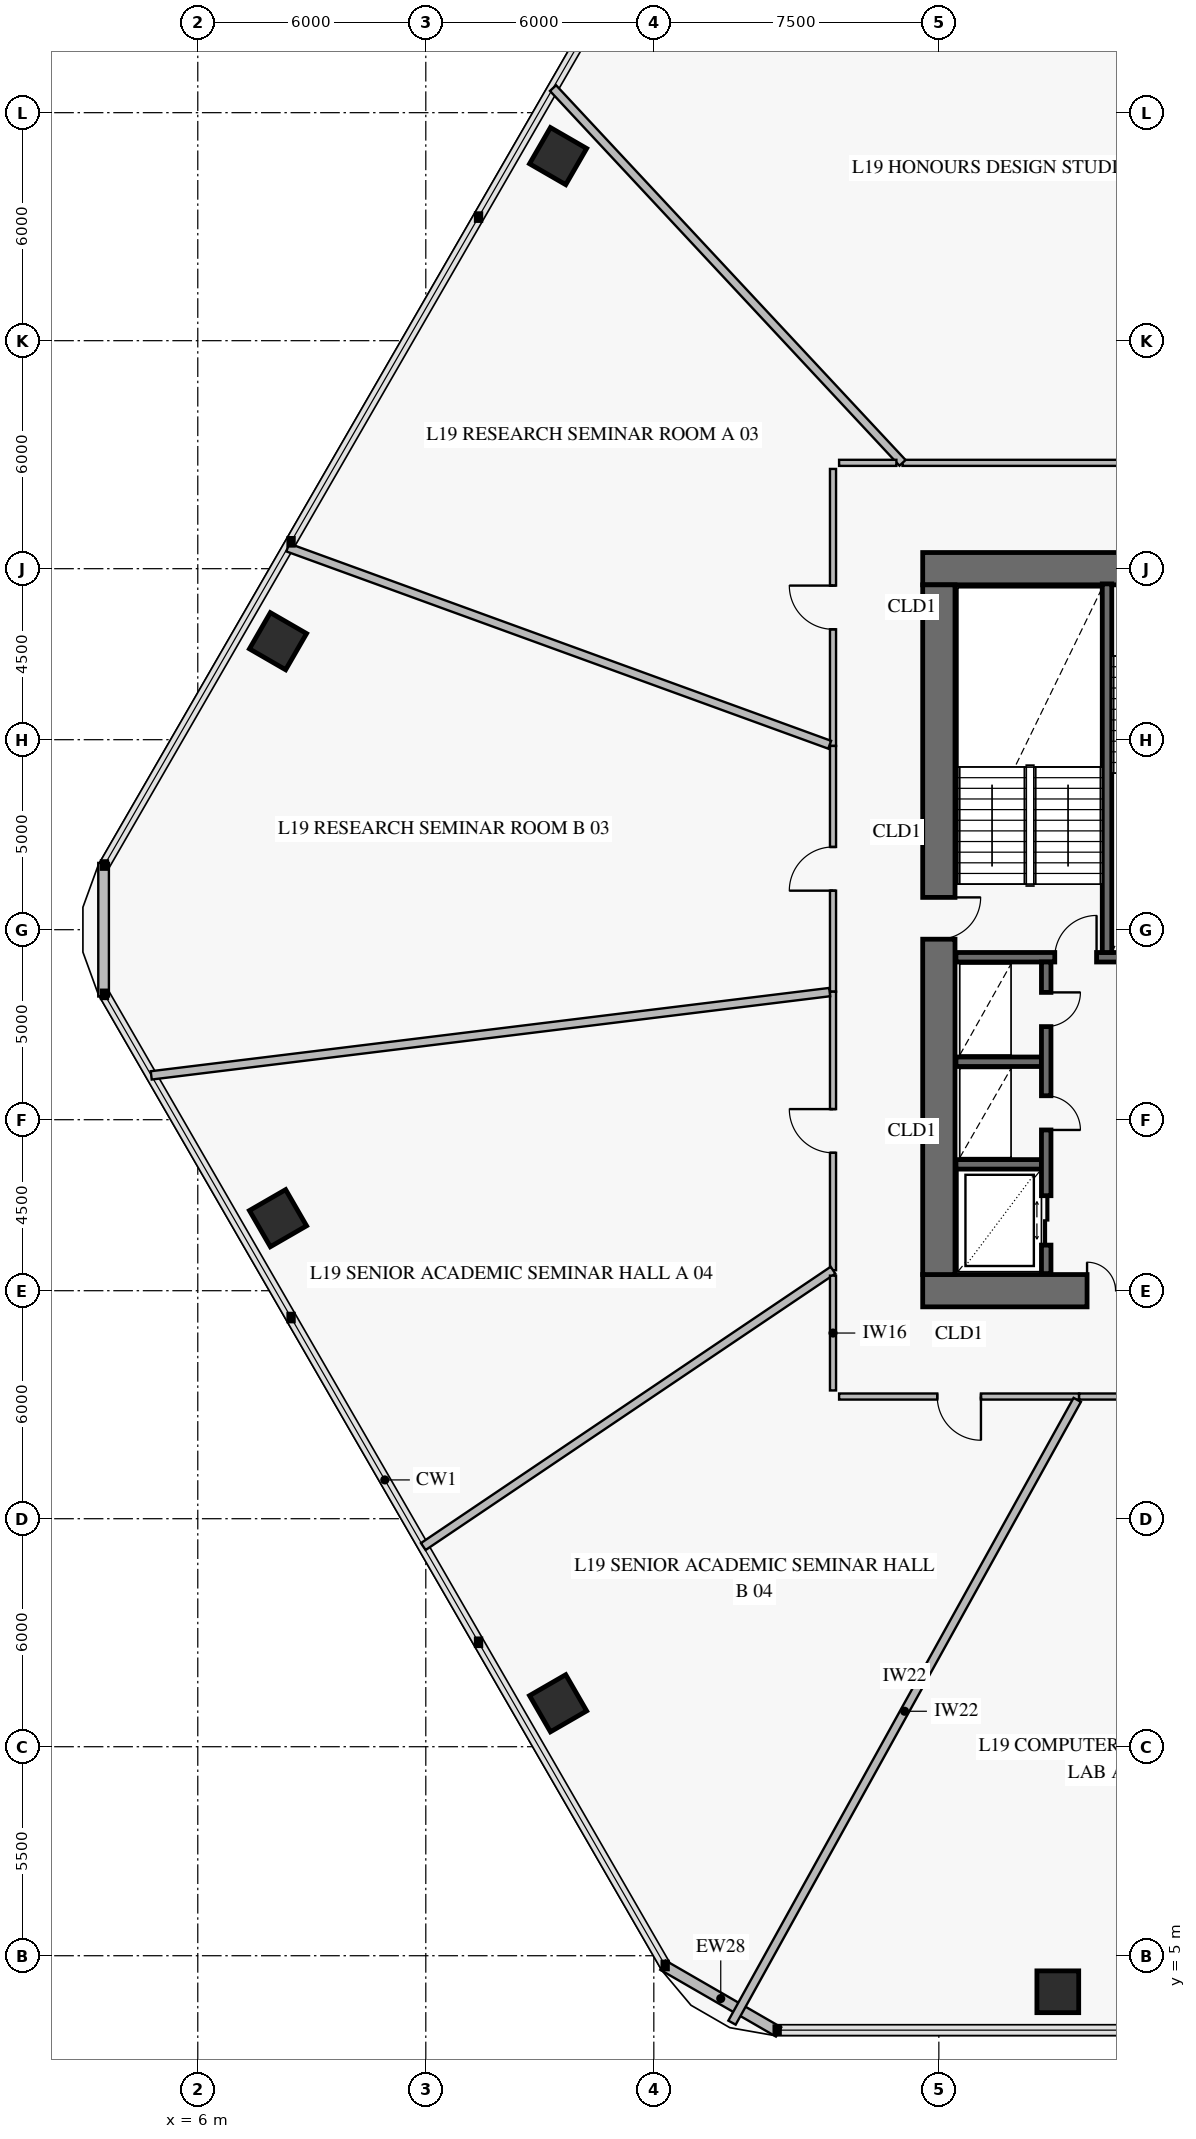
"""IFC4 building model, lengths in metres.
Left out: names, types, materials, properties, quantities, classifications, styles, units other than length and angle.
Written with IfcOpenShell. Run it as: python <this file> out.ifc"""

import sys

from ifc_helpers import new_model, si_unit, direction, frame, frame_2d, origin, origin_2d, place, context, subcontext, project, spatial, rectangle, extrude, element, fill, save


model = new_model("IFC4")
c1 = context("Model", 3, precision=1e-05, world=origin(), true_north=direction((0.0, 1.0)))
c2 = subcontext(c1, "Body", "Model", "MODEL_VIEW")
j1 = project(units=[si_unit("LENGTHUNIT", "METRE"), si_unit("PLANEANGLEUNIT", "RADIAN")], contexts=[c1])
p1 = place(None, origin())
s1 = spatial("IfcSite", under=j1, at=p1, CompositionType="ELEMENT")
p2 = place(p1, origin())
s2 = spatial("IfcBuilding", under=s1, at=p2, CompositionType="ELEMENT")
p3 = place(p2, frame((0.0, 0.0, 79.2)))
s3 = spatial("IfcBuildingStorey", under=s2, at=p3, CompositionType="ELEMENT", Elevation=79.2)
p4 = place(p3, frame((25.075, 22.5, 0.0), z_axis=(0.0, 0.0, 1.0), x_axis=(1.0, 0.0, 0.0)))
e1 = element("IfcWall", 1, at=p4, inside=s3, PredefinedType="SHEAR", context=c2, shape_type="SweptSolid", body=[
    extrude(rectangle(XDim=9.975, YDim=0.85, at=frame_2d((4.988, 0.0))), origin(), (0.0, 0.0, 1.0), 4.2),
])
p5 = place(p4, frame((4.325, 0.0, 0.0)))
e2 = element("IfcOpeningElement", 2, at=p5, cuts=e1, PredefinedType="OPENING", context=c2, shape_type="SweptSolid", body=[
    extrude(rectangle(XDim=1.5, YDim=2.15, at=frame_2d((0.75, 1.075))), frame((0.0, 0.437, 0.0), z_axis=(0.0, -1.0, 0.0), x_axis=(1.0, 0.0, 0.0)), (0.0, 0.0, 1.0), 0.874),
])
p6 = place(p3, frame((36.75, 41.5, 0.0), z_axis=(0.0, 0.0, 1.0), x_axis=(-1.0, 0.0, 0.0)))
e3 = element("IfcWall", 3, at=p6, inside=s3, PredefinedType="SHEAR", context=c2, shape_type="SweptSolid", body=[
    extrude(rectangle(XDim=11.675, YDim=0.85, at=frame_2d((5.837, 0.0))), origin(), (0.0, 0.0, 1.0), 4.2),
])
p7 = place(p6, frame((4.25, 0.0, 0.0)))
e4 = element("IfcOpeningElement", 4, at=p7, cuts=e3, PredefinedType="OPENING", context=c2, shape_type="SweptSolid", body=[
    extrude(rectangle(XDim=1.1, YDim=2.15, at=frame_2d((0.55, 1.075))), frame((0.0, 0.437, 0.0), z_axis=(0.0, -1.0, 0.0), x_axis=(1.0, 0.0, 0.0)), (0.0, 0.0, 1.0), 0.874),
])
p8 = place(p3, frame((25.5, 22.925, 0.0), z_axis=(0.0, 0.0, 1.0), x_axis=(0.0, 1.0, 0.0)))
e5 = element("IfcWall", 5, at=p8, inside=s3, PredefinedType="SHEAR", context=c2, shape_type="SweptSolid", body=[
    extrude(rectangle(XDim=18.15, YDim=0.85, at=frame_2d((9.075, 0.0))), origin(), (0.0, 0.0, 1.0), 4.2),
])
p9 = place(p8, frame((8.825, 0.0, 0.0)))
e6 = element("IfcOpeningElement", 6, at=p9, cuts=e5, PredefinedType="OPENING", context=c2, shape_type="SweptSolid", body=[
    extrude(rectangle(XDim=1.1, YDim=2.15, at=frame_2d((0.55, 1.075))), frame((0.0, 0.437, 0.0), z_axis=(0.0, -1.0, 0.0), x_axis=(1.0, 0.0, 0.0)), (0.0, 0.0, 1.0), 0.874),
])
for number, where, z_axis, x_axis in (
    (7, (15.481, 52.357, 0.0), (0.0, 0.0, 1.0), (-0.5, -0.866, 0.0)),
    (8, (8.111, 39.592, 0.0), (0.0, 0.0, 1.0), (-0.5, -0.866, 0.0)),
    (9, (8.111, 24.408, 0.0), (0.0, 0.0, 1.0), (0.5, -0.866, 0.0)),
    (10, (15.481, 11.643, 0.0), (0.0, 0.0, 1.0), (0.5, -0.866, 0.0)),
    (11, (28.63, 4.052, 0.0), (0.0, 0.0, 1.0), (1.0, 0.0, 0.0)),
):
    element("IfcColumn", number, at=place(p3, frame(where, z_axis=z_axis, x_axis=x_axis)), inside=s3, PredefinedType="COLUMN", context=c2, shape_type="SweptSolid", body=[
        extrude(rectangle(XDim=1.1, YDim=1.1, at=origin_2d()), origin(), (0.0, 0.0, 1.0), 3.92),
    ])
p10 = place(p3, frame((21.283, 2.994, 0.0), z_axis=(0.0, 0.0, 1.0), x_axis=(-0.866007452331, 0.500031091541, 0.0)))
e12 = element("IfcWall", 12, at=p10, inside=s3, PredefinedType="SOLIDWALL", context=c2, shape_type="SweptSolid", body=[
    extrude(rectangle(XDim=3.515, YDim=0.28, at=frame_2d((1.757, 0.0))), origin(), (0.0, 0.0, 1.0), 3.92),
])
p11 = place(p3, frame((3.521, 30.242, 0.0), z_axis=(0.0, 0.0, 1.0), x_axis=(0.0, 1.0, 0.0)))
e13 = element("IfcWall", 13, at=p11, inside=s3, PredefinedType="SOLIDWALL", context=c2, shape_type="SweptSolid", body=[
    extrude(rectangle(XDim=3.515, YDim=0.28, at=frame_2d((1.758, 0.0))), origin(), (0.0, 0.0, 1.0), 3.92),
])
p12 = place(p3, frame((25.95, 31.275, 0.0), z_axis=(0.0, 0.0, 1.0), x_axis=(1.0, 0.0, 0.0)))
e14 = element("IfcWall", 14, at=p12, inside=s3, PredefinedType="SOLIDWALL", context=c2, shape_type="SweptSolid", body=[
    extrude(rectangle(XDim=20.1, YDim=0.25, at=frame_2d((10.05, 0.0))), origin(), (0.0, 0.0, 1.0), 4.2),
])
p13 = place(p12, frame((2.6, 0.0, 0.0)))
e15 = element("IfcOpeningElement", 15, at=p13, cuts=e14, PredefinedType="OPENING", context=c2, shape_type="SweptSolid", body=[
    extrude(rectangle(XDim=1.1, YDim=2.15, at=frame_2d((0.55, 1.075))), frame((0.0, 0.137, 0.0), z_axis=(0.0, -1.0, 0.0), x_axis=(1.0, 0.0, 0.0)), (0.0, 0.0, 1.0), 0.274),
])
p14 = place(p12, frame((10.6, 0.0, 0.0)))
e16 = element("IfcOpeningElement", 16, at=p14, cuts=e14, PredefinedType="OPENING", context=c2, shape_type="SweptSolid", body=[
    extrude(rectangle(XDim=1.1, YDim=2.15, at=frame_2d((0.55, 1.075))), frame((0.0, 0.137, 0.0), z_axis=(0.0, -1.0, 0.0), x_axis=(1.0, 0.0, 0.0)), (0.0, 0.0, 1.0), 0.274),
])
p15 = place(p12, frame((16.35, 0.0, 0.0)))
e17 = element("IfcOpeningElement", 17, at=p15, cuts=e14, PredefinedType="OPENING", context=c2, shape_type="SweptSolid", body=[
    extrude(rectangle(XDim=1.1, YDim=2.15, at=frame_2d((0.55, 1.075))), frame((0.0, 0.137, 0.0), z_axis=(0.0, -1.0, 0.0), x_axis=(1.0, 0.0, 0.0)), (0.0, 0.0, 1.0), 0.274),
])
p16 = place(p3, frame((29.925, 31.4, 0.0), z_axis=(0.0, 0.0, 1.0), x_axis=(0.0, 1.0, 0.0)))
e18 = element("IfcWall", 18, at=p16, inside=s3, PredefinedType="SOLIDWALL", context=c2, shape_type="SweptSolid", body=[
    extrude(rectangle(XDim=9.7, YDim=0.25, at=frame_2d((4.85, 0.0))), origin(), (0.0, 0.0, 1.0), 4.2),
])
for number, where, z_axis, x_axis in (
    (19, (25.95, 25.825, 0.0), (0.0, 0.0, 1.0), (1.0, 0.0, 0.0)),
    (20, (25.95, 28.525, 0.0), (0.0, 0.0, 1.0), (1.0, 0.0, 0.0)),
):
    element("IfcWall", number, at=place(p3, frame(where, z_axis=z_axis, x_axis=x_axis)), inside=s3, PredefinedType="SOLIDWALL", context=c2, shape_type="SweptSolid", body=[
        extrude(rectangle(XDim=2.25, YDim=0.25, at=frame_2d((1.125, 0.0))), origin(), (0.0, 0.0, 1.0), 4.2),
    ])
p17 = place(p3, frame((28.325, 22.95, 0.0), z_axis=(0.0, 0.0, 1.0), x_axis=(0.0, 1.0, 0.0)))
e21 = element("IfcWall", 21, at=p17, inside=s3, PredefinedType="SOLIDWALL", context=c2, shape_type="SweptSolid", body=[
    extrude(rectangle(XDim=8.2, YDim=0.25, at=frame_2d((4.1, 0.0))), origin(), (0.0, 0.0, 1.0), 4.2),
])
p18 = place(p17, frame((0.75, 0.0, 0.0)))
e22 = element("IfcOpeningElement", 22, at=p18, cuts=e21, PredefinedType="OPENING", context=c2, shape_type="SweptSolid", body=[
    extrude(rectangle(XDim=1.3, YDim=2.3, at=frame_2d((0.65, 1.15))), frame((0.0, 0.137, 0.0), z_axis=(0.0, -1.0, 0.0), x_axis=(1.0, 0.0, 0.0)), (0.0, 0.0, 1.0), 0.274),
])
p19 = place(p17, frame((3.78, 0.0, 0.0)))
e23 = element("IfcOpeningElement", 23, at=p19, cuts=e21, PredefinedType="OPENING", context=c2, shape_type="SweptSolid", body=[
    extrude(rectangle(XDim=0.9, YDim=2.1, at=frame_2d((0.45, 1.05))), frame((0.0, 0.137, 0.0), z_axis=(0.0, -1.0, 0.0), x_axis=(1.0, 0.0, 0.0)), (0.0, 0.0, 1.0), 0.274),
])
p20 = place(p17, frame((6.5, 0.0, 0.0)))
e24 = element("IfcOpeningElement", 24, at=p20, cuts=e21, PredefinedType="OPENING", context=c2, shape_type="SweptSolid", body=[
    extrude(rectangle(XDim=0.9, YDim=2.1, at=frame_2d((0.45, 1.05))), frame((0.0, 0.137, 0.0), z_axis=(0.0, -1.0, 0.0), x_axis=(1.0, 0.0, 0.0)), (0.0, 0.0, 1.0), 0.274),
])
p21 = place(p3, frame((38.388, 44.285, 0.0), z_axis=(0.0, 0.0, 1.0), x_axis=(-1.0, 0.0, 0.0)))
e25 = element("IfcWall", 25, at=p21, inside=s3, PredefinedType="PARTITIONING", context=c2, shape_type="SweptSolid", body=[
    extrude(rectangle(XDim=13.844, YDim=0.16, at=frame_2d((6.922, 0.0))), origin(), (0.0, 0.0, 1.0), 3.22),
])
p22 = place(p21, frame((6.347, 0.0, 0.0)))
e26 = element("IfcOpeningElement", 26, at=p22, cuts=e25, PredefinedType="OPENING", context=c2, shape_type="SweptSolid", body=[
    extrude(rectangle(XDim=1.15, YDim=2.2, at=frame_2d((0.575, 1.1))), frame((0.0, 0.092, 0.0), z_axis=(0.0, -1.0, 0.0), x_axis=(1.0, 0.0, 0.0)), (0.0, 0.0, 1.0), 0.184),
])
p23 = place(p3, frame((22.715, 44.125, 0.0), z_axis=(0.0, 0.0, 1.0), x_axis=(0.0, -1.0, 0.0)))
e27 = element("IfcWall", 27, at=p23, inside=s3, PredefinedType="PARTITIONING", context=c2, shape_type="SweptSolid", body=[
    extrude(rectangle(XDim=7.29, YDim=0.16, at=frame_2d((3.645, 0.0))), origin(), (0.0, 0.0, 1.0), 3.92),
])
p24 = place(p23, frame((3.07, 0.0, 0.0)))
e28 = element("IfcOpeningElement", 28, at=p24, cuts=e27, PredefinedType="OPENING", context=c2, shape_type="SweptSolid", body=[
    extrude(rectangle(XDim=1.15, YDim=2.2, at=frame_2d((0.575, 1.1))), frame((0.0, 0.092, 0.0), z_axis=(0.0, -1.0, 0.0), x_axis=(1.0, 0.0, 0.0)), (0.0, 0.0, 1.0), 0.184),
])
p25 = place(p3, frame((22.715, 36.835, 0.0), z_axis=(0.0, 0.0, 1.0), x_axis=(0.0, -1.0, 0.0)))
e29 = element("IfcWall", 29, at=p25, inside=s3, PredefinedType="PARTITIONING", context=c2, shape_type="SweptSolid", body=[
    extrude(rectangle(XDim=6.466, YDim=0.16, at=frame_2d((3.233, 0.0))), origin(), (0.0, 0.0, 1.0), 3.22),
])
p26 = place(p25, frame((2.658, 0.0, 0.0)))
e30 = element("IfcOpeningElement", 30, at=p26, cuts=e29, PredefinedType="OPENING", context=c2, shape_type="SweptSolid", body=[
    extrude(rectangle(XDim=1.15, YDim=2.2, at=frame_2d((0.575, 1.1))), frame((0.0, 0.092, 0.0), z_axis=(0.0, -1.0, 0.0), x_axis=(1.0, 0.0, 0.0)), (0.0, 0.0, 1.0), 0.184),
])
p27 = place(p3, frame((22.715, 30.369, 0.0), z_axis=(0.0, 0.0, 1.0), x_axis=(0.0, -1.0, 0.0)))
e31 = element("IfcWall", 31, at=p27, inside=s3, PredefinedType="PARTITIONING", context=c2, shape_type="SweptSolid", body=[
    extrude(rectangle(XDim=7.33, YDim=0.16, at=frame_2d((3.665, 0.0))), origin(), (0.0, 0.0, 1.0), 3.22),
])
p28 = place(p27, frame((3.09, 0.0, 0.0)))
e32 = element("IfcOpeningElement", 32, at=p28, cuts=e31, PredefinedType="OPENING", context=c2, shape_type="SweptSolid", body=[
    extrude(rectangle(XDim=1.15, YDim=2.2, at=frame_2d((0.575, 1.1))), frame((0.0, 0.092, 0.0), z_axis=(0.0, -1.0, 0.0), x_axis=(1.0, 0.0, 0.0)), (0.0, 0.0, 1.0), 0.184),
])
p29 = place(p3, frame((22.875, 19.715, 0.0), z_axis=(0.0, 0.0, 1.0), x_axis=(1.0, 0.0, 0.0)))
e33 = element("IfcWall", 33, at=p29, inside=s3, PredefinedType="PARTITIONING", context=c2, shape_type="SweptSolid", body=[
    extrude(rectangle(XDim=6.315, YDim=0.16, at=frame_2d((3.158, 0.0))), origin(), (0.0, 0.0, 1.0), 3.22),
])
p30 = place(p29, frame((2.583, 0.0, 0.0)))
e34 = element("IfcOpeningElement", 34, at=p30, cuts=e33, PredefinedType="OPENING", context=c2, shape_type="SweptSolid", body=[
    extrude(rectangle(XDim=1.15, YDim=2.2, at=frame_2d((0.575, 1.1))), frame((0.0, 0.092, 0.0), z_axis=(0.0, -1.0, 0.0), x_axis=(1.0, 0.0, 0.0)), (0.0, 0.0, 1.0), 0.184),
])
p31 = place(p3, frame((29.19, 19.715, 0.0), z_axis=(0.0, 0.0, 1.0), x_axis=(1.0, 0.0, 0.0)))
e35 = element("IfcWall", 35, at=p31, inside=s3, PredefinedType="PARTITIONING", context=c2, shape_type="SweptSolid", body=[
    extrude(rectangle(XDim=6.381, YDim=0.16, at=frame_2d((3.19, 0.0))), origin(), (0.0, 0.0, 1.0), 3.22),
])
p32 = place(p31, frame((2.615, 0.0, 0.0)))
e36 = element("IfcOpeningElement", 36, at=p32, cuts=e35, PredefinedType="OPENING", context=c2, shape_type="SweptSolid", body=[
    extrude(rectangle(XDim=1.15, YDim=2.2, at=frame_2d((0.575, 1.1))), frame((0.0, 0.092, 0.0), z_axis=(0.0, -1.0, 0.0), x_axis=(1.0, 0.0, 0.0)), (0.0, 0.0, 1.0), 0.184),
])
p33 = place(p3, frame((24.544, 44.285, 0.0), z_axis=(0.0, 0.0, 1.0), x_axis=(-0.68200725148, 0.731345410137, 0.0)))
e37 = element("IfcWall", 37, at=p33, inside=s3, PredefinedType="PARTITIONING", context=c2, shape_type="SweptSolid", body=[
    extrude(rectangle(XDim=13.484, YDim=0.22, at=frame_2d((6.742, 0.0))), origin(), (0.0, 0.0, 1.0), 3.17),
])
p34 = place(p3, frame((22.627, 36.867, 0.0), z_axis=(0.0, 0.0, 1.0), x_axis=(-0.939694262915, 0.34201563158, 0.0)))
e38 = element("IfcWall", 38, at=p34, inside=s3, PredefinedType="PARTITIONING", context=c2, shape_type="SweptSolid", body=[
    extrude(rectangle(XDim=15.174, YDim=0.22, at=frame_2d((7.587, 0.0))), origin(), (0.0, 0.0, 1.0), 3.17),
])
p35 = place(p3, frame((24.383, 44.285, 0.0), z_axis=(0.0, 0.0, 1.0), x_axis=(-1.0, 0.0, 0.0)))
e39 = element("IfcWall", 39, at=p35, inside=s3, PredefinedType="PARTITIONING", context=c2, shape_type="SweptSolid", body=[
    extrude(rectangle(XDim=1.508, YDim=0.16, at=frame_2d((0.754, 0.0))), origin(), (0.0, 0.0, 1.0), 3.22),
])
p36 = place(p3, frame((22.627, 30.358, 0.0), z_axis=(0.0, 0.0, 1.0), x_axis=(-0.99254636489, -0.121867606624, 0.0)))
e40 = element("IfcWall", 40, at=p36, inside=s3, PredefinedType="PARTITIONING", context=c2, shape_type="SweptSolid", body=[
    extrude(rectangle(XDim=17.986, YDim=0.22, at=frame_2d((8.993, 0.0))), origin(), (0.0, 0.0, 1.0), 3.17),
])
p37 = place(p3, frame((22.715, 23.039, 0.0), z_axis=(0.0, 0.0, 1.0), x_axis=(-0.829037316792, -0.559193282654, 0.0)))
e41 = element("IfcWall", 41, at=p37, inside=s3, PredefinedType="PARTITIONING", context=c2, shape_type="SweptSolid", body=[
    extrude(rectangle(XDim=13.005, YDim=0.22, at=frame_2d((6.502, 0.0))), origin(), (0.0, 0.0, 1.0), 3.17),
])
p38 = place(p3, frame((22.715, 22.897, 0.0), z_axis=(0.0, 0.0, 1.0), x_axis=(0.0, -1.0, 0.0)))
e42 = element("IfcWall", 42, at=p38, inside=s3, PredefinedType="PARTITIONING", context=c2, shape_type="SweptSolid", body=[
    extrude(rectangle(XDim=3.022, YDim=0.16, at=frame_2d((1.511, 0.0))), origin(), (0.0, 0.0, 1.0), 3.92),
])
p39 = place(p3, frame((29.142, 19.627, 0.0), z_axis=(0.0, 0.0, 1.0), x_axis=(-0.484814111505, -0.874617217579, 0.0)))
e43 = element("IfcWall", 43, at=p39, inside=s3, PredefinedType="PARTITIONING", context=c2, shape_type="SweptSolid", body=[
    extrude(rectangle(XDim=18.738, YDim=0.22, at=frame_2d((9.369, 0.0))), origin(), (0.0, 0.0, 1.0), 3.17),
])
p40 = place(p9, frame((1.1, 0.0, 0.0), z_axis=(0.0, 0.0, 1.0), x_axis=(-1.0, 0.0, 0.0)))
e44 = element("IfcDoor", 44, at=p40, inside=s3, OperationType="SINGLE_SWING_LEFT", PredefinedType="USERDEFINED", context=c2, shape_type="SweptSolid", body=[
    extrude(rectangle(XDim=1.1, YDim=2.15, at=frame_2d((0.55, 1.075))), frame((0.0, 0.025, 0.0), z_axis=(0.0, -1.0, 0.0), x_axis=(1.0, 0.0, 0.0)), (0.0, 0.0, 1.0), 0.05),
])
fill(e6, e44)
p41 = place(p5, origin())
e45 = element("IfcDoor", 45, at=p41, inside=s3, OperationType="DOUBLE_DOOR_SINGLE_SWING", PredefinedType="DOOR", context=c2, shape_type="SweptSolid", body=[
    extrude(rectangle(XDim=1.5, YDim=2.15, at=frame_2d((0.75, 1.075))), frame((0.0, 0.025, 0.0), z_axis=(0.0, -1.0, 0.0), x_axis=(1.0, 0.0, 0.0)), (0.0, 0.0, 1.0), 0.05),
])
fill(e2, e45)
p42 = place(p13, origin())
e46 = element("IfcDoor", 46, at=p42, inside=s3, OperationType="SINGLE_SWING_RIGHT", PredefinedType="USERDEFINED", context=c2, shape_type="SweptSolid", body=[
    extrude(rectangle(XDim=1.1, YDim=2.15, at=frame_2d((0.55, 1.075))), frame((0.0, 0.025, 0.0), z_axis=(0.0, -1.0, 0.0), x_axis=(1.0, 0.0, 0.0)), (0.0, 0.0, 1.0), 0.05),
])
fill(e15, e46)
p43 = place(p18, frame((1.3, 0.0, 0.0), z_axis=(0.0, 0.0, 1.0), x_axis=(-1.0, 0.0, 0.0)))
e47 = element("IfcDoor", 47, at=p43, inside=s3, OperationType="DOUBLE_DOOR_SLIDING", PredefinedType="DOOR", context=c2, shape_type="SweptSolid", body=[
    extrude(rectangle(XDim=1.3, YDim=2.3, at=frame_2d((0.65, 1.15))), frame((0.0, 0.025, 0.0), z_axis=(0.0, -1.0, 0.0), x_axis=(1.0, 0.0, 0.0)), (0.0, 0.0, 1.0), 0.05),
])
fill(e22, e47)
p44 = place(p19, frame((0.9, 0.0, 0.0), z_axis=(0.0, 0.0, 1.0), x_axis=(-1.0, 0.0, 0.0)))
e48 = element("IfcDoor", 48, at=p44, inside=s3, OperationType="SINGLE_SWING_RIGHT", PredefinedType="DOOR", context=c2, shape_type="SweptSolid", body=[
    extrude(rectangle(XDim=0.9, YDim=2.1, at=frame_2d((0.45, 1.05))), frame((0.0, 0.025, 0.0), z_axis=(0.0, -1.0, 0.0), x_axis=(1.0, 0.0, 0.0)), (0.0, 0.0, 1.0), 0.05),
])
fill(e23, e48)
p45 = place(p20, frame((0.9, 0.0, 0.0), z_axis=(0.0, 0.0, 1.0), x_axis=(-1.0, 0.0, 0.0)))
e49 = element("IfcDoor", 49, at=p45, inside=s3, OperationType="SINGLE_SWING_LEFT", PredefinedType="DOOR", context=c2, shape_type="SweptSolid", body=[
    extrude(rectangle(XDim=0.9, YDim=2.1, at=frame_2d((0.45, 1.05))), frame((0.0, 0.025, 0.0), z_axis=(0.0, -1.0, 0.0), x_axis=(1.0, 0.0, 0.0)), (0.0, 0.0, 1.0), 0.05),
])
fill(e24, e49)
p46 = place(p24, frame((1.15, 0.0, 0.0), z_axis=(0.0, 0.0, 1.0), x_axis=(-1.0, 0.0, 0.0)))
e50 = element("IfcDoor", 50, at=p46, inside=s3, OperationType="SINGLE_SWING_RIGHT", PredefinedType="DOOR", context=c2, shape_type="SweptSolid", body=[
    extrude(rectangle(XDim=1.15, YDim=2.2, at=frame_2d((0.575, 1.1))), frame((0.0, 0.025, 0.0), z_axis=(0.0, -1.0, 0.0), x_axis=(1.0, 0.0, 0.0)), (0.0, 0.0, 1.0), 0.05),
])
fill(e28, e50)
p47 = place(p26, frame((1.15, 0.0, 0.0), z_axis=(0.0, 0.0, 1.0), x_axis=(-1.0, 0.0, 0.0)))
e51 = element("IfcDoor", 51, at=p47, inside=s3, OperationType="SINGLE_SWING_LEFT", PredefinedType="DOOR", context=c2, shape_type="SweptSolid", body=[
    extrude(rectangle(XDim=1.15, YDim=2.2, at=frame_2d((0.575, 1.1))), frame((0.0, 0.025, 0.0), z_axis=(0.0, -1.0, 0.0), x_axis=(1.0, 0.0, 0.0)), (0.0, 0.0, 1.0), 0.05),
])
fill(e30, e51)
p48 = place(p28, frame((1.15, 0.0, 0.0), z_axis=(0.0, 0.0, 1.0), x_axis=(-1.0, 0.0, 0.0)))
e52 = element("IfcDoor", 52, at=p48, inside=s3, OperationType="SINGLE_SWING_RIGHT", PredefinedType="DOOR", context=c2, shape_type="SweptSolid", body=[
    extrude(rectangle(XDim=1.15, YDim=2.2, at=frame_2d((0.575, 1.1))), frame((0.0, 0.025, 0.0), z_axis=(0.0, -1.0, 0.0), x_axis=(1.0, 0.0, 0.0)), (0.0, 0.0, 1.0), 0.05),
])
fill(e32, e52)
p49 = place(p30, frame((1.15, 0.0, 0.0), z_axis=(0.0, 0.0, 1.0), x_axis=(-1.0, 0.0, 0.0)))
e53 = element("IfcDoor", 53, at=p49, inside=s3, OperationType="SINGLE_SWING_LEFT", PredefinedType="DOOR", context=c2, shape_type="SweptSolid", body=[
    extrude(rectangle(XDim=1.15, YDim=2.2, at=frame_2d((0.575, 1.1))), frame((0.0, 0.025, 0.0), z_axis=(0.0, -1.0, 0.0), x_axis=(1.0, 0.0, 0.0)), (0.0, 0.0, 1.0), 0.05),
])
fill(e34, e53)
save(model, sys.argv[1])
